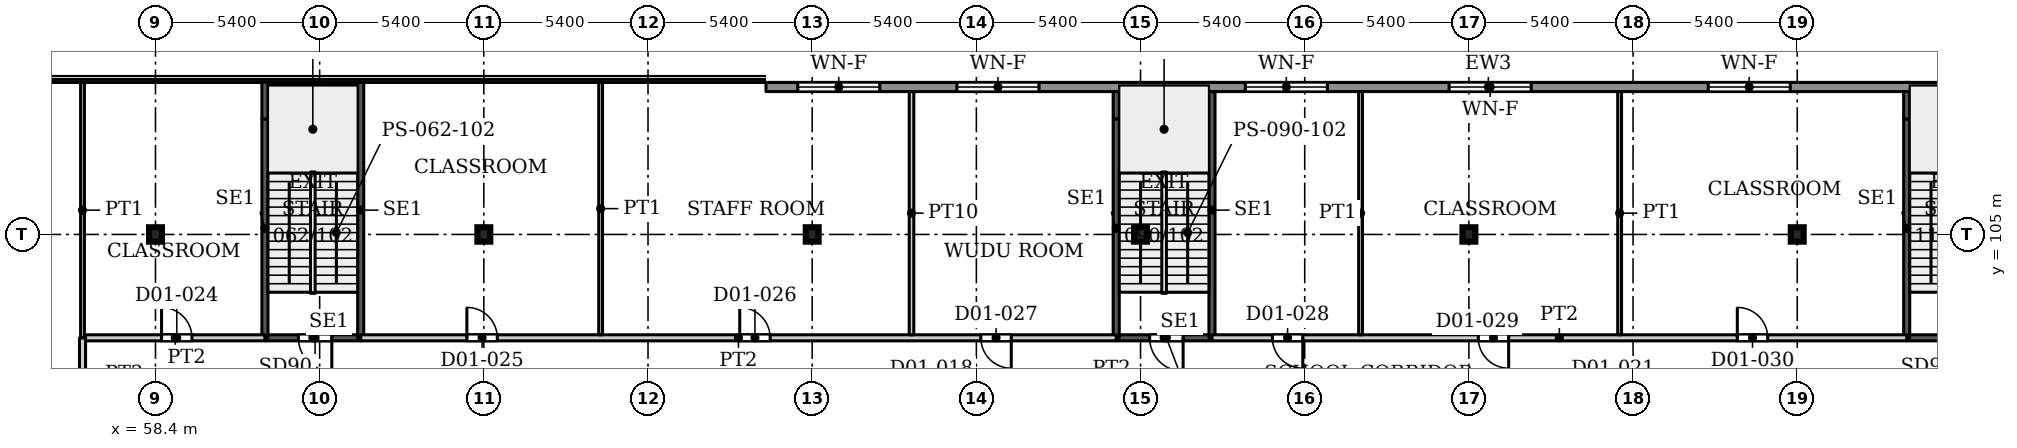
"""IFC4 building model, lengths in metres.
Left out: names, types, materials, properties, quantities, classifications, styles, units other than length and angle.
Written with IfcOpenShell. Run it as: python <this file> out.ifc"""

import sys

from ifc_helpers import new_model, si_unit, direction, frame, frame_2d, origin, origin_2d, place, context, subcontext, project, spatial, rectangle, i_section, extrude, source, transform, mapped, element, fill, save


model = new_model("IFC4")
c1 = context("Model", 3, precision=1e-05, world=origin(), true_north=direction((0.0, 1.0)))
c2 = subcontext(c1, "Body", "Model", "MODEL_VIEW")
j1 = project(units=[si_unit("LENGTHUNIT", "METRE"), si_unit("PLANEANGLEUNIT", "RADIAN")], contexts=[c1])
p1 = place(None, origin())
s1 = spatial("IfcSite", under=j1, at=p1, CompositionType="ELEMENT")
p2 = place(p1, origin())
s2 = spatial("IfcBuilding", under=s1, at=p2, CompositionType="ELEMENT")
p3 = place(p2, frame((0.0, 0.0, 7.5)))
s3 = spatial("IfcBuildingStorey", under=s2, at=p3, CompositionType="ELEMENT", Elevation=7.5)
for number, where, z_axis, x_axis in (
    (1, (58.4, 105.0, 0.0), (0.0, 0.0, 1.0), (1.0, 0.0, 0.0)),
    (2, (69.2, 105.0, 0.0), (0.0, 0.0, 1.0), (1.0, 0.0, 0.0)),
    (3, (80.0, 105.0, 0.0), (0.0, 0.0, 1.0), (1.0, 0.0, 0.0)),
    (4, (90.8, 105.0, 0.0), (0.0, 0.0, 1.0), (1.0, 0.0, 0.0)),
    (5, (101.6, 105.0, 0.0), (0.0, 0.0, 1.0), (1.0, 0.0, 0.0)),
    (6, (112.4, 105.0, 0.0), (0.0, 0.0, 1.0), (1.0, 0.0, 0.0)),
):
    element("IfcColumn", number, at=place(p3, frame(where, z_axis=z_axis, x_axis=x_axis)), inside=s3, PredefinedType="COLUMN", context=c2, shape_type="SweptSolid", body=[
        extrude(i_section(OverallWidth=0.424, OverallDepth=0.474, WebThickness=0.048, FlangeThickness=0.077, FilletRadius=0.014, at=origin_2d()), origin(), (0.0, 0.0, 1.0), 5.0),
    ])
p4 = place(p3, frame((78.48, 109.85, 0.0), z_axis=(0.0, 0.0, 1.0), x_axis=(1.0, 0.0, 0.0)))
e7 = element("IfcWall", 7, at=p4, inside=s3, PredefinedType="SOLIDWALL", context=c2, shape_type="SweptSolid", body=[
    extrude(rectangle(XDim=47.52, YDim=0.3, at=frame_2d((23.76, 0.0))), origin(), (0.0, 0.0, 1.0), 4.75),
])
p5 = place(p4, frame((1.045, 0.0, 0.6)))
e8 = element("IfcOpeningElement", 8, at=p5, cuts=e7, PredefinedType="OPENING", context=c2, shape_type="SweptSolid", body=[
    extrude(rectangle(XDim=2.7, YDim=3.0, at=frame_2d((1.35, 1.5))), frame((0.0, 0.16, 0.0), z_axis=(0.0, -1.0, 0.0), x_axis=(1.0, 0.0, 0.0)), (0.0, 0.0, 1.0), 0.32),
])
p6 = place(p4, frame((6.28, 0.0, 0.6)))
e9 = element("IfcOpeningElement", 9, at=p6, cuts=e7, PredefinedType="OPENING", context=c2, shape_type="SweptSolid", body=[
    extrude(rectangle(XDim=2.7, YDim=3.0, at=frame_2d((1.35, 1.5))), frame((0.0, 0.16, 0.0), z_axis=(0.0, -1.0, 0.0), x_axis=(1.0, 0.0, 0.0)), (0.0, 0.0, 1.0), 0.32),
])
p7 = place(p4, frame((15.765, 0.0, 0.6)))
e10 = element("IfcOpeningElement", 10, at=p7, cuts=e7, PredefinedType="OPENING", context=c2, shape_type="SweptSolid", body=[
    extrude(rectangle(XDim=2.7, YDim=3.0, at=frame_2d((1.35, 1.5))), frame((0.0, 0.16, 0.0), z_axis=(0.0, -1.0, 0.0), x_axis=(1.0, 0.0, 0.0)), (0.0, 0.0, 1.0), 0.32),
])
p8 = place(p4, frame((22.47, 0.0, 0.6)))
e11 = element("IfcOpeningElement", 11, at=p8, cuts=e7, PredefinedType="OPENING", context=c2, shape_type="SweptSolid", body=[
    extrude(rectangle(XDim=2.7, YDim=3.0, at=frame_2d((1.35, 1.5))), frame((0.0, 0.16, 0.0), z_axis=(0.0, -1.0, 0.0), x_axis=(1.0, 0.0, 0.0)), (0.0, 0.0, 1.0), 0.32),
])
p9 = place(p4, frame((30.99, 0.0, 0.6)))
e12 = element("IfcOpeningElement", 12, at=p9, cuts=e7, PredefinedType="OPENING", context=c2, shape_type="SweptSolid", body=[
    extrude(rectangle(XDim=2.7, YDim=3.0, at=frame_2d((1.35, 1.5))), frame((0.0, 0.16, 0.0), z_axis=(0.0, -1.0, 0.0), x_axis=(1.0, 0.0, 0.0)), (0.0, 0.0, 1.0), 0.32),
])
p10 = place(p4, frame((41.545, 0.0, 0.6)))
e13 = element("IfcOpeningElement", 13, at=p10, cuts=e7, PredefinedType="OPENING", context=c2, shape_type="SweptSolid", body=[
    extrude(rectangle(XDim=2.7, YDim=3.0, at=frame_2d((1.35, 1.5))), frame((0.0, 0.16, 0.0), z_axis=(0.0, -1.0, 0.0), x_axis=(1.0, 0.0, 0.0)), (0.0, 0.0, 1.0), 0.32),
])
p11 = place(p3, frame((62.0, 101.6, 0.0), z_axis=(0.0, 0.0, 1.0), x_axis=(1.0, 0.0, 0.0)))
e14 = element("IfcWall", 14, at=p11, inside=s3, PredefinedType="SHEAR", context=c2, shape_type="SweptSolid", body=[
    extrude(rectangle(XDim=3.15, YDim=0.2, at=frame_2d((1.575, 0.0))), origin(), (0.0, 0.0, 1.0), 5.0),
])
p12 = place(p11, frame((1.1, 0.0, 0.0)))
e15 = element("IfcOpeningElement", 15, at=p12, cuts=e14, PredefinedType="OPENING", context=c2, shape_type="SweptSolid", body=[
    extrude(rectangle(XDim=1.1, YDim=2.2, at=frame_2d((0.55, 1.1))), frame((0.0, 0.11, 0.0), z_axis=(0.0, -1.0, 0.0), x_axis=(1.0, 0.0, 0.0)), (0.0, 0.0, 1.0), 0.22),
])
p13 = place(p3, frame((62.0, 101.6, 0.0), z_axis=(0.0, 0.0, 1.0), x_axis=(0.0, 1.0, 0.0)))
e16 = element("IfcWall", 16, at=p13, inside=s3, PredefinedType="SHEAR", context=c2, shape_type="SweptSolid", body=[
    extrude(rectangle(XDim=7.2, YDim=0.2, at=frame_2d((3.6, 0.0))), origin(), (0.0, 0.0, 1.0), 5.0),
])
p14 = place(p3, frame((62.0, 108.8, 0.0), z_axis=(0.0, 0.0, 1.0), x_axis=(0.0, 1.0, 0.0)))
e17 = element("IfcWall", 17, at=p14, inside=s3, PredefinedType="SHEAR", context=c2, shape_type="SweptSolid", body=[
    extrude(rectangle(XDim=1.2, YDim=0.2, at=frame_2d((0.6, 0.0))), origin(), (0.0, 0.0, 1.0), 5.0),
])
p15 = place(p3, frame((65.15, 101.6, 0.0), z_axis=(0.0, 0.0, 1.0), x_axis=(0.0, 1.0, 0.0)))
e18 = element("IfcWall", 18, at=p15, inside=s3, PredefinedType="SHEAR", context=c2, shape_type="SweptSolid", body=[
    extrude(rectangle(XDim=8.4, YDim=0.2, at=frame_2d((4.2, 0.0))), origin(), (0.0, 0.0, 1.0), 5.0),
])
p16 = place(p3, frame((90.0, 101.6, 0.0), z_axis=(0.0, 0.0, 1.0), x_axis=(1.0, 0.0, 0.0)))
e19 = element("IfcWall", 19, at=p16, inside=s3, PredefinedType="SHEAR", context=c2, shape_type="SweptSolid", body=[
    extrude(rectangle(XDim=3.15, YDim=0.2, at=frame_2d((1.575, 0.0))), origin(), (0.0, 0.0, 1.0), 5.0),
])
p17 = place(p16, frame((1.1, 0.0, 0.0)))
e20 = element("IfcOpeningElement", 20, at=p17, cuts=e19, PredefinedType="OPENING", context=c2, shape_type="SweptSolid", body=[
    extrude(rectangle(XDim=1.1, YDim=2.2, at=frame_2d((0.55, 1.1))), frame((0.0, 0.11, 0.0), z_axis=(0.0, -1.0, 0.0), x_axis=(1.0, 0.0, 0.0)), (0.0, 0.0, 1.0), 0.22),
])
p18 = place(p3, frame((90.0, 101.6, 0.0), z_axis=(0.0, 0.0, 1.0), x_axis=(0.0, 1.0, 0.0)))
e21 = element("IfcWall", 21, at=p18, inside=s3, PredefinedType="SHEAR", context=c2, shape_type="SweptSolid", body=[
    extrude(rectangle(XDim=7.2, YDim=0.2, at=frame_2d((3.6, 0.0))), origin(), (0.0, 0.0, 1.0), 5.0),
])
p19 = place(p3, frame((90.0, 108.8, 0.0), z_axis=(0.0, 0.0, 1.0), x_axis=(0.0, 1.0, 0.0)))
e22 = element("IfcWall", 22, at=p19, inside=s3, PredefinedType="SHEAR", context=c2, shape_type="SweptSolid", body=[
    extrude(rectangle(XDim=1.2, YDim=0.2, at=frame_2d((0.6, 0.0))), origin(), (0.0, 0.0, 1.0), 5.0),
])
p20 = place(p3, frame((93.15, 101.6, 0.0), z_axis=(0.0, 0.0, 1.0), x_axis=(0.0, 1.0, 0.0)))
e23 = element("IfcWall", 23, at=p20, inside=s3, PredefinedType="SHEAR", context=c2, shape_type="SweptSolid", body=[
    extrude(rectangle(XDim=8.4, YDim=0.2, at=frame_2d((4.2, 0.0))), origin(), (0.0, 0.0, 1.0), 5.0),
])
p21 = place(p3, frame((116.0, 101.6, 0.0), z_axis=(0.0, 0.0, 1.0), x_axis=(1.0, 0.0, 0.0)))
e24 = element("IfcWall", 24, at=p21, inside=s3, PredefinedType="SHEAR", context=c2, shape_type="SweptSolid", body=[
    extrude(rectangle(XDim=3.15, YDim=0.2, at=frame_2d((1.575, 0.0))), origin(), (0.0, 0.0, 1.0), 5.0),
])
p22 = place(p21, frame((1.1, 0.0, 0.0)))
e25 = element("IfcOpeningElement", 25, at=p22, cuts=e24, PredefinedType="OPENING", context=c2, shape_type="SweptSolid", body=[
    extrude(rectangle(XDim=1.1, YDim=2.2, at=frame_2d((0.55, 1.1))), frame((0.0, 0.11, 0.0), z_axis=(0.0, -1.0, 0.0), x_axis=(1.0, 0.0, 0.0)), (0.0, 0.0, 1.0), 0.22),
])
p23 = place(p3, frame((116.0, 101.6, 0.0), z_axis=(0.0, 0.0, 1.0), x_axis=(0.0, 1.0, 0.0)))
e26 = element("IfcWall", 26, at=p23, inside=s3, PredefinedType="SHEAR", context=c2, shape_type="SweptSolid", body=[
    extrude(rectangle(XDim=7.2, YDim=0.2, at=frame_2d((3.6, 0.0))), origin(), (0.0, 0.0, 1.0), 5.0),
])
p24 = place(p3, frame((116.0, 108.8, 0.0), z_axis=(0.0, 0.0, 1.0), x_axis=(0.0, 1.0, 0.0)))
e27 = element("IfcWall", 27, at=p24, inside=s3, PredefinedType="SHEAR", context=c2, shape_type="SweptSolid", body=[
    extrude(rectangle(XDim=1.2, YDim=0.2, at=frame_2d((0.6, 0.0))), origin(), (0.0, 0.0, 1.0), 5.0),
])
p25 = place(p3, frame((56.0, 99.2, 0.0), z_axis=(0.0, 0.0, 1.0), x_axis=(0.0, 1.0, 0.0)))
e28 = element("IfcWall", 28, at=p25, inside=s3, PredefinedType="PARTITIONING", context=c2, shape_type="SweptSolid", body=[
    extrude(rectangle(XDim=2.4, YDim=0.2, at=frame_2d((1.2, 0.0))), origin(), (0.0, 0.0, 1.0), 4.68),
])
p26 = place(p3, frame((56.0, 101.6, 0.0), z_axis=(0.0, 0.0, 1.0), x_axis=(0.0, 1.0, 0.0)))
e29 = element("IfcWall", 29, at=p26, inside=s3, PredefinedType="PARTITIONING", context=c2, shape_type="SweptSolid", body=[
    extrude(rectangle(XDim=8.4, YDim=0.125, at=frame_2d((4.2, 0.0))), origin(), (0.0, 0.0, 1.0), 4.68),
])
p27 = place(p3, frame((56.1, 101.6, 0.0), z_axis=(0.0, 0.0, 1.0), x_axis=(1.0, 0.0, 0.0)))
e30 = element("IfcWall", 30, at=p27, inside=s3, PredefinedType="PARTITIONING", context=c2, shape_type="SweptSolid", body=[
    extrude(rectangle(XDim=5.9, YDim=0.2, at=frame_2d((2.95, 0.0))), origin(), (0.0, 0.0, 1.0), 4.68),
])
p28 = place(p27, frame((2.5, 0.0, 0.0)))
e31 = element("IfcOpeningElement", 31, at=p28, cuts=e30, PredefinedType="OPENING", context=c2, shape_type="SweptSolid", body=[
    extrude(rectangle(XDim=1.0, YDim=2.1, at=frame_2d((0.5, 1.05))), frame((0.0, 0.11, 0.0), z_axis=(0.0, -1.0, 0.0), x_axis=(1.0, 0.0, 0.0)), (0.0, 0.0, 1.0), 0.22),
])
p29 = place(p3, frame((65.15, 101.6, 0.0), z_axis=(0.0, 0.0, 1.0), x_axis=(1.0, 0.0, 0.0)))
e32 = element("IfcWall", 32, at=p29, inside=s3, PredefinedType="PARTITIONING", context=c2, shape_type="SweptSolid", body=[
    extrude(rectangle(XDim=24.85, YDim=0.2, at=frame_2d((12.425, 0.0))), origin(), (0.0, 0.0, 1.0), 4.68),
])
p30 = place(p29, frame((3.492, 0.0, 0.0)))
e33 = element("IfcOpeningElement", 33, at=p30, cuts=e32, PredefinedType="OPENING", context=c2, shape_type="SweptSolid", body=[
    extrude(rectangle(XDim=1.0, YDim=2.1, at=frame_2d((0.5, 1.05))), frame((0.0, 0.11, 0.0), z_axis=(0.0, -1.0, 0.0), x_axis=(1.0, 0.0, 0.0)), (0.0, 0.0, 1.0), 0.22),
])
p31 = place(p29, frame((12.467, 0.0, 0.0)))
e34 = element("IfcOpeningElement", 34, at=p31, cuts=e32, PredefinedType="OPENING", context=c2, shape_type="SweptSolid", body=[
    extrude(rectangle(XDim=1.0, YDim=2.1, at=frame_2d((0.5, 1.05))), frame((0.0, 0.11, 0.0), z_axis=(0.0, -1.0, 0.0), x_axis=(1.0, 0.0, 0.0)), (0.0, 0.0, 1.0), 0.22),
])
p32 = place(p29, frame((20.398, 0.0, 0.0)))
e35 = element("IfcOpeningElement", 35, at=p32, cuts=e32, PredefinedType="OPENING", context=c2, shape_type="SweptSolid", body=[
    extrude(rectangle(XDim=1.0, YDim=2.1, at=frame_2d((0.5, 1.05))), frame((0.0, 0.11, 0.0), z_axis=(0.0, -1.0, 0.0), x_axis=(1.0, 0.0, 0.0)), (0.0, 0.0, 1.0), 0.22),
])
p33 = place(p3, frame((73.042, 101.7, 0.0), z_axis=(0.0, 0.0, 1.0), x_axis=(0.0, 1.0, 0.0)))
e36 = element("IfcWall", 36, at=p33, inside=s3, PredefinedType="PARTITIONING", context=c2, shape_type="SweptSolid", body=[
    extrude(rectangle(XDim=8.3, YDim=0.125, at=frame_2d((4.15, 0.0))), origin(), (0.0, 0.0, 1.0), 4.68),
])
p34 = place(p3, frame((83.267, 101.7, 0.0), z_axis=(0.0, 0.0, 1.0), x_axis=(0.0, 1.0, 0.0)))
e37 = element("IfcWall", 37, at=p34, inside=s3, PredefinedType="PARTITIONING", context=c2, shape_type="SweptSolid", body=[
    extrude(rectangle(XDim=8.001, YDim=0.15, at=frame_2d((4.0, 0.0))), origin(), (0.0, 0.0, 1.0), 4.68),
])
p35 = place(p3, frame((93.15, 101.6, 0.0), z_axis=(0.0, 0.0, 1.0), x_axis=(1.0, 0.0, 0.0)))
e38 = element("IfcWall", 38, at=p35, inside=s3, PredefinedType="PARTITIONING", context=c2, shape_type="SweptSolid", body=[
    extrude(rectangle(XDim=22.85, YDim=0.2, at=frame_2d((11.425, 0.0))), origin(), (0.0, 0.0, 1.0), 4.68),
])
p36 = place(p35, frame((1.987, 0.0, 0.0)))
e39 = element("IfcOpeningElement", 39, at=p36, cuts=e38, PredefinedType="OPENING", context=c2, shape_type="SweptSolid", body=[
    extrude(rectangle(XDim=1.0, YDim=2.1, at=frame_2d((0.5, 1.05))), frame((0.0, 0.11, 0.0), z_axis=(0.0, -1.0, 0.0), x_axis=(1.0, 0.0, 0.0)), (0.0, 0.0, 1.0), 0.22),
])
p37 = place(p35, frame((8.758, 0.0, 0.0)))
e40 = element("IfcOpeningElement", 40, at=p37, cuts=e38, PredefinedType="OPENING", context=c2, shape_type="SweptSolid", body=[
    extrude(rectangle(XDim=1.0, YDim=2.1, at=frame_2d((0.5, 1.05))), frame((0.0, 0.11, 0.0), z_axis=(0.0, -1.0, 0.0), x_axis=(1.0, 0.0, 0.0)), (0.0, 0.0, 1.0), 0.22),
])
p38 = place(p35, frame((17.279, 0.0, 0.0)))
e41 = element("IfcOpeningElement", 41, at=p38, cuts=e38, PredefinedType="OPENING", context=c2, shape_type="SweptSolid", body=[
    extrude(rectangle(XDim=1.0, YDim=2.1, at=frame_2d((0.5, 1.05))), frame((0.0, 0.11, 0.0), z_axis=(0.0, -1.0, 0.0), x_axis=(1.0, 0.0, 0.0)), (0.0, 0.0, 1.0), 0.22),
])
for number, where, z_axis, x_axis in (
    (42, (98.037, 101.7, 0.0), (0.0, 0.0, 1.0), (0.0, 1.0, 0.0)),
    (43, (106.558, 101.7, 0.0), (0.0, 0.0, 1.0), (0.0, 1.0, 0.0)),
):
    element("IfcWall", number, at=place(p3, frame(where, z_axis=z_axis, x_axis=x_axis)), inside=s3, PredefinedType="PARTITIONING", context=c2, shape_type="SweptSolid", body=[
        extrude(rectangle(XDim=8.001, YDim=0.125, at=frame_2d((4.0, 0.0))), origin(), (0.0, 0.0, 1.0), 4.68),
    ])
m1 = source(origin(), c2, "Body", "SweptSolid", [
    extrude(rectangle(XDim=2.7, YDim=3.0, at=frame_2d((1.35, 1.5))), frame((0.0, 0.03, 0.0), z_axis=(0.0, -1.0, 0.0), x_axis=(1.0, 0.0, 0.0)), (0.0, 0.0, 1.0), 0.06),
])
p39 = place(p5, origin())
e44 = element("IfcWindow", 44, at=p39, inside=s3, PartitioningType="SINGLE_PANEL", PredefinedType="WINDOW", context=c2, shape_type="MappedRepresentation", body=[
    mapped(m1, transform((0.0, 0.0, 0.0), x_axis=(1.0, 0.0, 0.0), y_axis=(0.0, 1.0, 0.0), z_axis=(0.0, 0.0, 1.0), scale=1.0)),
])
fill(e8, e44)
p40 = place(p6, origin())
e45 = element("IfcWindow", 45, at=p40, inside=s3, PartitioningType="SINGLE_PANEL", PredefinedType="WINDOW", context=c2, shape_type="MappedRepresentation", body=[
    mapped(m1, transform((0.0, 0.0, 0.0), x_axis=(1.0, 0.0, 0.0), y_axis=(0.0, 1.0, 0.0), z_axis=(0.0, 0.0, 1.0), scale=1.0)),
])
fill(e9, e45)
p41 = place(p7, origin())
e46 = element("IfcWindow", 46, at=p41, inside=s3, PartitioningType="SINGLE_PANEL", PredefinedType="WINDOW", context=c2, shape_type="MappedRepresentation", body=[
    mapped(m1, transform((0.0, 0.0, 0.0), x_axis=(1.0, 0.0, 0.0), y_axis=(0.0, 1.0, 0.0), z_axis=(0.0, 0.0, 1.0), scale=1.0)),
])
fill(e10, e46)
p42 = place(p8, origin())
e47 = element("IfcWindow", 47, at=p42, inside=s3, PartitioningType="SINGLE_PANEL", PredefinedType="WINDOW", context=c2, shape_type="MappedRepresentation", body=[
    mapped(m1, transform((0.0, 0.0, 0.0), x_axis=(1.0, 0.0, 0.0), y_axis=(0.0, 1.0, 0.0), z_axis=(0.0, 0.0, 1.0), scale=1.0)),
])
fill(e11, e47)
p43 = place(p9, origin())
e48 = element("IfcWindow", 48, at=p43, inside=s3, PartitioningType="SINGLE_PANEL", PredefinedType="WINDOW", context=c2, shape_type="MappedRepresentation", body=[
    mapped(m1, transform((0.0, 0.0, 0.0), x_axis=(1.0, 0.0, 0.0), y_axis=(0.0, 1.0, 0.0), z_axis=(0.0, 0.0, 1.0), scale=1.0)),
])
fill(e12, e48)
m2 = source(origin(), c2, "Body", "SweptSolid", [
    extrude(rectangle(XDim=1.1, YDim=2.2, at=frame_2d((0.55, 1.1))), frame((0.0, 0.025, 0.0), z_axis=(0.0, -1.0, 0.0), x_axis=(1.0, 0.0, 0.0)), (0.0, 0.0, 1.0), 0.05),
])
p44 = place(p12, origin())
e49 = element("IfcDoor", 49, at=p44, inside=s3, OperationType="SINGLE_SWING_RIGHT", PredefinedType="DOOR", context=c2, shape_type="MappedRepresentation", body=[
    mapped(m2, transform((0.0, 0.0, 0.0), x_axis=(1.0, 0.0, 0.0), y_axis=(0.0, 1.0, 0.0), z_axis=(0.0, 0.0, 1.0), scale=1.0)),
])
fill(e15, e49)
p45 = place(p17, origin())
e50 = element("IfcDoor", 50, at=p45, inside=s3, OperationType="SINGLE_SWING_RIGHT", PredefinedType="DOOR", context=c2, shape_type="MappedRepresentation", body=[
    mapped(m2, transform((0.0, 0.0, 0.0), x_axis=(1.0, 0.0, 0.0), y_axis=(0.0, 1.0, 0.0), z_axis=(0.0, 0.0, 1.0), scale=1.0)),
])
fill(e20, e50)
m3 = source(origin(), c2, "Body", "SweptSolid", [
    extrude(rectangle(XDim=1.0, YDim=2.1, at=frame_2d((0.5, 1.05))), frame((0.0, 0.025, 0.0), z_axis=(0.0, -1.0, 0.0), x_axis=(1.0, 0.0, 0.0)), (0.0, 0.0, 1.0), 0.05),
])
p46 = place(p28, origin())
e51 = element("IfcDoor", 51, at=p46, inside=s3, OperationType="SINGLE_SWING_LEFT", PredefinedType="DOOR", context=c2, shape_type="MappedRepresentation", body=[
    mapped(m3, transform((0.0, 0.0, 0.0), x_axis=(1.0, 0.0, 0.0), y_axis=(0.0, 1.0, 0.0), z_axis=(0.0, 0.0, 1.0), scale=1.0)),
])
fill(e31, e51)
p47 = place(p30, origin())
e52 = element("IfcDoor", 52, at=p47, inside=s3, OperationType="SINGLE_SWING_LEFT", PredefinedType="DOOR", context=c2, shape_type="MappedRepresentation", body=[
    mapped(m3, transform((0.0, 0.0, 0.0), x_axis=(1.0, 0.0, 0.0), y_axis=(0.0, 1.0, 0.0), z_axis=(0.0, 0.0, 1.0), scale=1.0)),
])
fill(e33, e52)
p48 = place(p31, origin())
e53 = element("IfcDoor", 53, at=p48, inside=s3, OperationType="SINGLE_SWING_LEFT", PredefinedType="DOOR", context=c2, shape_type="MappedRepresentation", body=[
    mapped(m3, transform((0.0, 0.0, 0.0), x_axis=(1.0, 0.0, 0.0), y_axis=(0.0, 1.0, 0.0), z_axis=(0.0, 0.0, 1.0), scale=1.0)),
])
fill(e34, e53)
p49 = place(p32, origin())
e54 = element("IfcDoor", 54, at=p49, inside=s3, OperationType="SINGLE_SWING_RIGHT", PredefinedType="DOOR", context=c2, shape_type="MappedRepresentation", body=[
    mapped(m3, transform((0.0, 0.0, 0.0), x_axis=(1.0, 0.0, 0.0), y_axis=(0.0, 1.0, 0.0), z_axis=(0.0, 0.0, 1.0), scale=1.0)),
])
fill(e35, e54)
p50 = place(p36, origin())
e55 = element("IfcDoor", 55, at=p50, inside=s3, OperationType="SINGLE_SWING_RIGHT", PredefinedType="DOOR", context=c2, shape_type="MappedRepresentation", body=[
    mapped(m3, transform((0.0, 0.0, 0.0), x_axis=(1.0, 0.0, 0.0), y_axis=(0.0, 1.0, 0.0), z_axis=(0.0, 0.0, 1.0), scale=1.0)),
])
fill(e39, e55)
p51 = place(p37, origin())
e56 = element("IfcDoor", 56, at=p51, inside=s3, OperationType="SINGLE_SWING_RIGHT", PredefinedType="DOOR", context=c2, shape_type="MappedRepresentation", body=[
    mapped(m3, transform((0.0, 0.0, 0.0), x_axis=(1.0, 0.0, 0.0), y_axis=(0.0, 1.0, 0.0), z_axis=(0.0, 0.0, 1.0), scale=1.0)),
])
fill(e40, e56)
p52 = place(p38, origin())
e57 = element("IfcDoor", 57, at=p52, inside=s3, OperationType="SINGLE_SWING_LEFT", PredefinedType="DOOR", context=c2, shape_type="MappedRepresentation", body=[
    mapped(m3, transform((0.0, 0.0, 0.0), x_axis=(1.0, 0.0, 0.0), y_axis=(0.0, 1.0, 0.0), z_axis=(0.0, 0.0, 1.0), scale=1.0)),
])
fill(e41, e57)
save(model, sys.argv[1])
